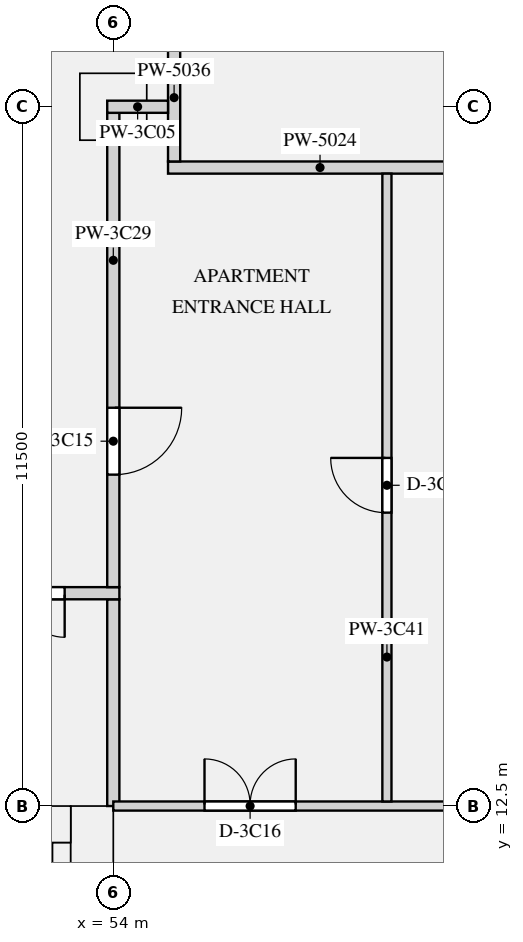
"""IFC4 building model, lengths in metres.
Left out: names, types, materials, properties, quantities, classifications, styles, units other than length and angle.
Written with IfcOpenShell. Run it as: python <this file> out.ifc"""

import sys

from ifc_helpers import new_model, si_unit, direction, frame, frame_2d, origin, origin_2d, place, context, subcontext, project, spatial, rectangle, extrude, element, fill, save


model = new_model("IFC4")
c1 = context("Model", 3, precision=1e-05, world=origin(), true_north=direction((0.0, 1.0)))
c2 = subcontext(c1, "Body", "Model", "MODEL_VIEW")
j1 = project(units=[si_unit("LENGTHUNIT", "METRE"), si_unit("PLANEANGLEUNIT", "RADIAN")], contexts=[c1])
p1 = place(None, origin())
s1 = spatial("IfcSite", under=j1, at=p1, CompositionType="ELEMENT")
p2 = place(p1, origin())
s2 = spatial("IfcBuilding", under=s1, at=p2, CompositionType="ELEMENT")
p3 = place(p2, frame((0.0, 0.0, 160.2)))
s3 = spatial("IfcBuildingStorey", under=s2, at=p3, CompositionType="ELEMENT", Elevation=160.2)
p4 = place(p3, frame((54.0, 24.0, 0.0), z_axis=(0.0, 0.0, 1.0), x_axis=(1.0, 0.0, 0.0)))
e1 = element("IfcColumn", 1, at=p4, inside=s3, PredefinedType="COLUMN", context=c2, shape_type="SweptSolid", body=[
    extrude(rectangle(XDim=1.1, YDim=1.1, at=origin_2d()), origin(), (0.0, 0.0, 1.0), 3.15),
])
p5 = place(p3, frame((53.65, 0.0, 0.0), z_axis=(0.0, 0.0, 1.0), x_axis=(0.0, 1.0, 0.0)))
e2 = element("IfcWall", 2, at=p5, inside=s3, PredefinedType="SHEAR", context=c2, shape_type="SweptSolid", body=[
    extrude(rectangle(XDim=12.5, YDim=0.7, at=frame_2d((6.25, 0.0))), origin(), (0.0, 0.0, 1.0), 3.15),
])
p6 = place(p3, frame((18.7, 12.2, 0.0), z_axis=(0.0, 0.0, 1.0), x_axis=(1.0, 0.0, 0.0)))
e3 = element("IfcWall", 3, at=p6, inside=s3, PredefinedType="SHEAR", context=c2, shape_type="SweptSolid", body=[
    extrude(rectangle(XDim=34.6, YDim=0.6, at=frame_2d((17.3, 0.0))), origin(), (0.0, 0.0, 1.0), 3.15),
])
p7 = place(p6, frame((24.475, 0.0, 0.0)))
e4 = element("IfcOpeningElement", 4, at=p7, cuts=e3, PredefinedType="OPENING", context=c2, shape_type="SweptSolid", body=[
    extrude(rectangle(XDim=1.1, YDim=2.1, at=frame_2d((0.55, 1.05))), frame((0.0, 0.31, 0.0), z_axis=(0.0, -1.0, 0.0), x_axis=(1.0, 0.0, 0.0)), (0.0, 0.0, 1.0), 0.62),
])
p8 = place(p6, frame((26.725, 0.0, 0.0)))
e5 = element("IfcOpeningElement", 5, at=p8, cuts=e3, PredefinedType="OPENING", context=c2, shape_type="SweptSolid", body=[
    extrude(rectangle(XDim=1.1, YDim=2.1, at=frame_2d((0.55, 1.05))), frame((0.0, 0.31, 0.0), z_axis=(0.0, -1.0, 0.0), x_axis=(1.0, 0.0, 0.0)), (0.0, 0.0, 1.0), 0.62),
])
p9 = place(p6, frame((28.975, 0.0, 0.0)))
e6 = element("IfcOpeningElement", 6, at=p9, cuts=e3, PredefinedType="OPENING", context=c2, shape_type="SweptSolid", body=[
    extrude(rectangle(XDim=1.1, YDim=2.1, at=frame_2d((0.55, 1.05))), frame((0.0, 0.31, 0.0), z_axis=(0.0, -1.0, 0.0), x_axis=(1.0, 0.0, 0.0)), (0.0, 0.0, 1.0), 0.62),
])
p10 = place(p6, frame((4.85, 0.0, 0.0)))
e7 = element("IfcOpeningElement", 7, at=p10, cuts=e3, PredefinedType="OPENING", context=c2, shape_type="SweptSolid", body=[
    extrude(rectangle(XDim=0.9, YDim=2.1, at=frame_2d((0.45, 1.05))), frame((0.0, 0.31, 0.0), z_axis=(0.0, -1.0, 0.0), x_axis=(1.0, 0.0, 0.0)), (0.0, 0.0, 1.0), 0.62),
])
p11 = place(p6, frame((13.85, 0.0, 0.0)))
e8 = element("IfcOpeningElement", 8, at=p11, cuts=e3, PredefinedType="OPENING", context=c2, shape_type="SweptSolid", body=[
    extrude(rectangle(XDim=0.9, YDim=2.1, at=frame_2d((0.45, 1.05))), frame((0.0, 0.31, 0.0), z_axis=(0.0, -1.0, 0.0), x_axis=(1.0, 0.0, 0.0)), (0.0, 0.0, 1.0), 0.62),
])
p12 = place(p6, frame((18.35, 0.0, 0.0)))
e9 = element("IfcOpeningElement", 9, at=p12, cuts=e3, PredefinedType="OPENING", context=c2, shape_type="SweptSolid", body=[
    extrude(rectangle(XDim=0.9, YDim=2.1, at=frame_2d((0.45, 1.05))), frame((0.0, 0.31, 0.0), z_axis=(0.0, -1.0, 0.0), x_axis=(1.0, 0.0, 0.0)), (0.0, 0.0, 1.0), 0.62),
])
p13 = place(p6, frame((1.45, 0.0, 0.0)))
e10 = element("IfcOpeningElement", 10, at=p13, cuts=e3, PredefinedType="OPENING", context=c2, shape_type="SweptSolid", body=[
    extrude(rectangle(XDim=1.2, YDim=2.1, at=frame_2d((0.6, 1.05))), frame((0.0, 0.31, 0.0), z_axis=(0.0, -1.0, 0.0), x_axis=(1.0, 0.0, 0.0)), (0.0, 0.0, 1.0), 0.62),
])
p14 = place(p6, frame((31.95, 0.0, 0.0)))
e11 = element("IfcOpeningElement", 11, at=p14, cuts=e3, PredefinedType="OPENING", context=c2, shape_type="SweptSolid", body=[
    extrude(rectangle(XDim=1.2, YDim=2.1, at=frame_2d((0.6, 1.05))), frame((0.0, 0.31, 0.0), z_axis=(0.0, -1.0, 0.0), x_axis=(1.0, 0.0, 0.0)), (0.0, 0.0, 1.0), 0.62),
])
p15 = place(p3, frame((53.15, 1.0, 0.0), z_axis=(0.0, 0.0, 1.0), x_axis=(0.0, 1.0, 0.0)))
e12 = element("IfcWall", 12, at=p15, inside=s3, PredefinedType="SHEAR", context=c2, shape_type="SweptSolid", body=[
    extrude(rectangle(XDim=10.9, YDim=0.3, at=frame_2d((5.45, 0.0))), origin(), (0.0, 0.0, 1.0), 3.15),
])
p16 = place(p3, frame((54.9, 23.0, 0.0), z_axis=(0.0, 0.0, 1.0), x_axis=(1.0, 0.0, 0.0)))
e13 = element("IfcWall", 13, at=p16, inside=s3, PredefinedType="PARTITIONING", context=c2, shape_type="SweptSolid", body=[
    extrude(rectangle(XDim=5.0, YDim=0.2, at=frame_2d((2.5, 0.0))), origin(), (0.0, 0.0, 1.0), 2.83),
])
p17 = place(p3, frame((54.0, 12.5, 0.0), z_axis=(0.0, 0.0, 1.0), x_axis=(0.0, 1.0, 0.0)))
e14 = element("IfcWall", 14, at=p17, inside=s3, PredefinedType="PARTITIONING", context=c2, shape_type="SweptSolid", body=[
    extrude(rectangle(XDim=3.4, YDim=0.2, at=frame_2d((1.7, 0.0))), origin(), (0.0, 0.0, 1.0), 2.83),
])
p18 = place(p3, frame((55.0, 23.1, 0.0), z_axis=(0.0, 0.0, 1.0), x_axis=(0.0, 1.0, 0.0)))
e15 = element("IfcWall", 15, at=p18, inside=s3, PredefinedType="PARTITIONING", context=c2, shape_type="SweptSolid", body=[
    extrude(rectangle(XDim=3.8, YDim=0.2, at=frame_2d((1.9, 0.0))), origin(), (0.0, 0.0, 1.0), 2.83),
])
p19 = place(p18, frame((2.1, 0.0, 0.0)))
e16 = element("IfcOpeningElement", 16, at=p19, cuts=e15, PredefinedType="OPENING", context=c2, shape_type="SweptSolid", body=[
    extrude(rectangle(XDim=1.2, YDim=2.1, at=frame_2d((0.6, 1.05))), frame((0.0, 0.11, 0.0), z_axis=(0.0, -1.0, 0.0), x_axis=(1.0, 0.0, 0.0)), (0.0, 0.0, 1.0), 0.22),
])
p20 = place(p3, frame((53.9, 24.0, 0.0), z_axis=(0.0, 0.0, 1.0), x_axis=(1.0, 0.0, 0.0)))
e17 = element("IfcWall", 17, at=p20, inside=s3, PredefinedType="PARTITIONING", context=c2, shape_type="SweptSolid", body=[
    extrude(rectangle(XDim=1.0, YDim=0.2, at=frame_2d((0.5, 0.0))), origin(), (0.0, 0.0, 1.0), 2.83),
])
p21 = place(p3, frame((54.0, 12.5, 0.0), z_axis=(0.0, 0.0, 1.0), x_axis=(1.0, 0.0, 0.0)))
e18 = element("IfcWall", 18, at=p21, inside=s3, PredefinedType="PARTITIONING", context=c2, shape_type="SweptSolid", body=[
    extrude(rectangle(XDim=17.3, YDim=0.15, at=frame_2d((8.65, 0.0))), origin(), (0.0, 0.0, 1.0), 2.83),
])
p22 = place(p21, frame((1.5, 0.0, 0.0)))
e19 = element("IfcOpeningElement", 19, at=p22, cuts=e18, PredefinedType="OPENING", context=c2, shape_type="SweptSolid", body=[
    extrude(rectangle(XDim=1.5, YDim=2.1, at=frame_2d((0.75, 1.05))), frame((0.0, 0.085, 0.0), z_axis=(0.0, -1.0, 0.0), x_axis=(1.0, 0.0, 0.0)), (0.0, 0.0, 1.0), 0.17),
])
p23 = place(p21, frame((12.75, 0.0, 0.0)))
e20 = element("IfcOpeningElement", 20, at=p23, cuts=e18, PredefinedType="OPENING", context=c2, shape_type="SweptSolid", body=[
    extrude(rectangle(XDim=1.5, YDim=2.1, at=frame_2d((0.75, 1.05))), frame((0.0, 0.085, 0.0), z_axis=(0.0, -1.0, 0.0), x_axis=(1.0, 0.0, 0.0)), (0.0, 0.0, 1.0), 0.17),
])
p24 = place(p3, frame((17.9, 16.0, 0.0), z_axis=(0.0, 0.0, 1.0), x_axis=(1.0, 0.0, 0.0)))
e21 = element("IfcWall", 21, at=p24, inside=s3, PredefinedType="PARTITIONING", context=c2, shape_type="SweptSolid", body=[
    extrude(rectangle(XDim=36.2, YDim=0.2, at=frame_2d((18.1, 0.0))), origin(), (0.0, 0.0, 1.0), 2.83),
])
p25 = place(p24, frame((0.9, 0.0, 0.0)))
e22 = element("IfcOpeningElement", 22, at=p25, cuts=e21, PredefinedType="OPENING", context=c2, shape_type="SweptSolid", body=[
    extrude(rectangle(XDim=1.4, YDim=2.1, at=frame_2d((0.7, 1.05))), frame((0.0, 0.11, 0.0), z_axis=(0.0, -1.0, 0.0), x_axis=(1.0, 0.0, 0.0)), (0.0, 0.0, 1.0), 0.22),
])
p26 = place(p24, frame((33.9, 0.0, 0.0)))
e23 = element("IfcOpeningElement", 23, at=p26, cuts=e21, PredefinedType="OPENING", context=c2, shape_type="SweptSolid", body=[
    extrude(rectangle(XDim=1.4, YDim=2.1, at=frame_2d((0.7, 1.05))), frame((0.0, 0.11, 0.0), z_axis=(0.0, -1.0, 0.0), x_axis=(1.0, 0.0, 0.0)), (0.0, 0.0, 1.0), 0.22),
])
p27 = place(p3, frame((54.0, 16.1, 0.0), z_axis=(0.0, 0.0, 1.0), x_axis=(0.0, 1.0, 0.0)))
e24 = element("IfcWall", 24, at=p27, inside=s3, PredefinedType="PARTITIONING", context=c2, shape_type="SweptSolid", body=[
    extrude(rectangle(XDim=7.8, YDim=0.2, at=frame_2d((3.9, 0.0))), origin(), (0.0, 0.0, 1.0), 2.83),
])
p28 = place(p27, frame((1.85, 0.0, 0.0)))
e25 = element("IfcOpeningElement", 25, at=p28, cuts=e24, PredefinedType="OPENING", context=c2, shape_type="SweptSolid", body=[
    extrude(rectangle(XDim=1.1, YDim=2.1, at=frame_2d((0.55, 1.05))), frame((0.0, 0.11, 0.0), z_axis=(0.0, -1.0, 0.0), x_axis=(1.0, 0.0, 0.0)), (0.0, 0.0, 1.0), 0.22),
])
p29 = place(p3, frame((58.5, 12.575, 0.0), z_axis=(0.0, 0.0, 1.0), x_axis=(0.0, 1.0, 0.0)))
e26 = element("IfcWall", 26, at=p29, inside=s3, PredefinedType="PARTITIONING", context=c2, shape_type="SweptSolid", body=[
    extrude(rectangle(XDim=10.325, YDim=0.15, at=frame_2d((5.163, 0.0))), origin(), (0.0, 0.0, 1.0), 2.83),
])
p30 = place(p29, frame((4.75, 0.0, 0.0)))
e27 = element("IfcOpeningElement", 27, at=p30, cuts=e26, PredefinedType="OPENING", context=c2, shape_type="SweptSolid", body=[
    extrude(rectangle(XDim=0.9, YDim=2.1, at=frame_2d((0.45, 1.05))), frame((0.0, 0.085, 0.0), z_axis=(0.0, -1.0, 0.0), x_axis=(1.0, 0.0, 0.0)), (0.0, 0.0, 1.0), 0.17),
])
p31 = place(p26, frame((1.4, 0.0, 0.0), z_axis=(0.0, 0.0, 1.0), x_axis=(-1.0, 0.0, 0.0)))
e28 = element("IfcDoor", 28, at=p31, inside=s3, OperationType="DOUBLE_DOOR_SINGLE_SWING", PredefinedType="DOOR", context=c2, shape_type="SweptSolid", body=[
    extrude(rectangle(XDim=1.4, YDim=2.1, at=frame_2d((0.7, 1.05))), frame((0.0, 0.025, 0.0), z_axis=(0.0, -1.0, 0.0), x_axis=(1.0, 0.0, 0.0)), (0.0, 0.0, 1.0), 0.05),
])
fill(e23, e28)
p32 = place(p28, frame((1.1, 0.0, 0.0), z_axis=(0.0, 0.0, 1.0), x_axis=(-1.0, 0.0, 0.0)))
e29 = element("IfcDoor", 29, at=p32, inside=s3, OperationType="SINGLE_SWING_LEFT", PredefinedType="DOOR", context=c2, shape_type="SweptSolid", body=[
    extrude(rectangle(XDim=1.1, YDim=2.1, at=frame_2d((0.55, 1.05))), frame((0.0, 0.025, 0.0), z_axis=(0.0, -1.0, 0.0), x_axis=(1.0, 0.0, 0.0)), (0.0, 0.0, 1.0), 0.05),
])
fill(e25, e29)
p33 = place(p22, origin())
e30 = element("IfcDoor", 30, at=p33, inside=s3, OperationType="DOUBLE_DOOR_SINGLE_SWING", PredefinedType="DOOR", context=c2, shape_type="SweptSolid", body=[
    extrude(rectangle(XDim=1.5, YDim=2.1, at=frame_2d((0.75, 1.05))), frame((0.0, 0.025, 0.0), z_axis=(0.0, -1.0, 0.0), x_axis=(1.0, 0.0, 0.0)), (0.0, 0.0, 1.0), 0.05),
])
fill(e19, e30)
p34 = place(p30, origin())
e31 = element("IfcDoor", 31, at=p34, inside=s3, OperationType="SINGLE_SWING_RIGHT", PredefinedType="DOOR", context=c2, shape_type="SweptSolid", body=[
    extrude(rectangle(XDim=0.9, YDim=2.1, at=frame_2d((0.45, 1.05))), frame((0.0, 0.025, 0.0), z_axis=(0.0, -1.0, 0.0), x_axis=(1.0, 0.0, 0.0)), (0.0, 0.0, 1.0), 0.05),
])
fill(e27, e31)
save(model, sys.argv[1])
